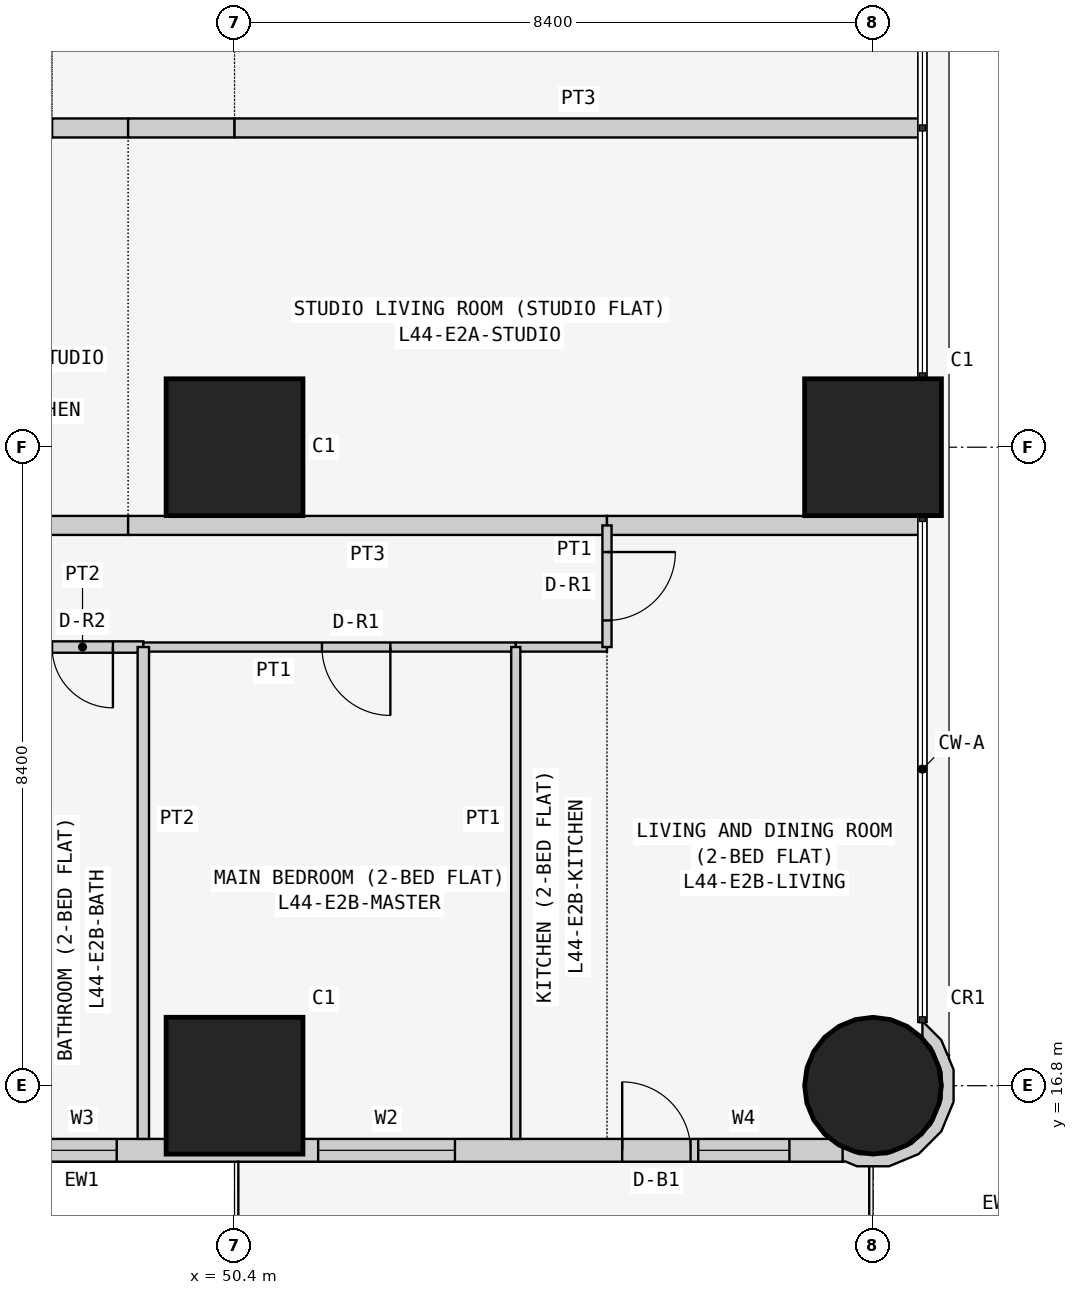
"""IFC4 building model, lengths in metres.
Left out: names, types, materials, properties, quantities, classifications, styles, units other than length and angle.
Written with IfcOpenShell. Run it as: python <this file> out.ifc"""

import sys

from ifc_helpers import new_model, si_unit, direction, frame, frame_2d, origin, origin_2d, place, context, subcontext, project, spatial, polyline, rectangle, circle, outline, extrude, element, fill, save


model = new_model("IFC4")
c1 = context("Model", 3, precision=1e-05, world=origin(), true_north=direction((0.0, 1.0)))
c2 = subcontext(c1, "Body", "Model", "MODEL_VIEW")
j1 = project(units=[si_unit("LENGTHUNIT", "METRE"), si_unit("PLANEANGLEUNIT", "RADIAN")], contexts=[c1])
p1 = place(None, origin())
s1 = spatial("IfcSite", under=j1, at=p1, CompositionType="ELEMENT")
p2 = place(p1, origin())
s2 = spatial("IfcBuilding", under=s1, at=p2, CompositionType="ELEMENT")
p3 = place(p2, frame((0.0, 0.0, 170.1)))
s3 = spatial("IfcBuildingStorey", under=s2, at=p3, CompositionType="ELEMENT", Elevation=170.1)
for number, where, z_axis, x_axis in (
    (1, (50.4, 16.8, 0.0), (0.0, 0.0, 1.0), (1.0, 0.0, 0.0)),
    (2, (50.4, 25.2, 0.0), (0.0, 0.0, 1.0), (1.0, 0.0, 0.0)),
):
    element("IfcColumn", number, at=place(p3, frame(where, z_axis=z_axis, x_axis=x_axis)), inside=s3, PredefinedType="COLUMN", context=c2, shape_type="SweptSolid", body=[
        extrude(rectangle(XDim=1.8, YDim=1.8, at=origin_2d()), origin(), (0.0, 0.0, 1.0), 3.6),
    ])
p4 = place(p3, frame((58.8, 16.8, 0.0), z_axis=(0.0, 0.0, 1.0), x_axis=(1.0, 0.0, 0.0)))
e3 = element("IfcColumn", 3, at=p4, inside=s3, PredefinedType="COLUMN", context=c2, shape_type="SweptSolid", body=[
    extrude(circle(Radius=0.9, at=origin_2d()), origin(), (0.0, 0.0, 1.0), 3.6),
])
p5 = place(p3, frame((58.8, 25.2, 0.0), z_axis=(0.0, 0.0, 1.0), x_axis=(1.0, 0.0, 0.0)))
e4 = element("IfcColumn", 4, at=p5, inside=s3, PredefinedType="COLUMN", context=c2, shape_type="SweptSolid", body=[
    extrude(rectangle(XDim=1.8, YDim=1.8, at=origin_2d()), origin(), (0.0, 0.0, 1.0), 3.6),
])
p6 = place(p3, frame((43.0, 15.95, 0.0), z_axis=(0.0, 0.0, 1.0), x_axis=(1.0, 0.0, 0.0)))
e5 = element("IfcWall", 5, at=p6, inside=s3, PredefinedType="SOLIDWALL", context=c2, shape_type="SweptSolid", body=[
    extrude(rectangle(XDim=15.4, YDim=0.3, at=frame_2d((7.7, 0.0))), origin(), (0.0, 0.0, 1.0), 3.45),
])
p7 = place(p6, frame((1.2, 0.0, 0.9)))
e6 = element("IfcOpeningElement", 6, at=p7, cuts=e5, PredefinedType="OPENING", context=c2, shape_type="SweptSolid", body=[
    extrude(rectangle(XDim=1.8, YDim=1.5, at=frame_2d((0.9, 0.75))), frame((0.0, 0.16, 0.0), z_axis=(0.0, -1.0, 0.0), x_axis=(1.0, 0.0, 0.0)), (0.0, 0.0, 1.0), 0.32),
])
p8 = place(p6, frame((4.95, 0.0, 1.5)))
e7 = element("IfcOpeningElement", 7, at=p8, cuts=e5, PredefinedType="OPENING", context=c2, shape_type="SweptSolid", body=[
    extrude(rectangle(XDim=0.9, YDim=0.7, at=frame_2d((0.45, 0.35))), frame((0.0, 0.16, 0.0), z_axis=(0.0, -1.0, 0.0), x_axis=(1.0, 0.0, 0.0)), (0.0, 0.0, 1.0), 0.32),
])
p9 = place(p6, frame((8.5, 0.0, 0.9)))
e8 = element("IfcOpeningElement", 8, at=p9, cuts=e5, PredefinedType="OPENING", context=c2, shape_type="SweptSolid", body=[
    extrude(rectangle(XDim=1.8, YDim=1.5, at=frame_2d((0.9, 0.75))), frame((0.0, 0.16, 0.0), z_axis=(0.0, -1.0, 0.0), x_axis=(1.0, 0.0, 0.0)), (0.0, 0.0, 1.0), 0.32),
])
p10 = place(p6, frame((12.5, 0.0, 0.0)))
e9 = element("IfcOpeningElement", 9, at=p10, cuts=e5, PredefinedType="OPENING", context=c2, shape_type="SweptSolid", body=[
    extrude(rectangle(XDim=0.9, YDim=2.4, at=frame_2d((0.45, 1.2))), frame((0.0, 0.16, 0.0), z_axis=(0.0, -1.0, 0.0), x_axis=(1.0, 0.0, 0.0)), (0.0, 0.0, 1.0), 0.32),
])
p11 = place(p6, frame((13.5, 0.0, 0.9)))
e10 = element("IfcOpeningElement", 10, at=p11, cuts=e5, PredefinedType="OPENING", context=c2, shape_type="SweptSolid", body=[
    extrude(rectangle(XDim=1.2, YDim=1.5, at=frame_2d((0.6, 0.75))), frame((0.0, 0.16, 0.0), z_axis=(0.0, -1.0, 0.0), x_axis=(1.0, 0.0, 0.0)), (0.0, 0.0, 1.0), 0.32),
])
p12 = place(p3, frame((58.436, 15.89, 0.0), z_axis=(0.0, 0.0, 1.0), x_axis=(0.926129809145, -0.377204953059, 0.0)))
e11 = element("IfcWall", 11, at=p12, inside=s3, PredefinedType="SOLIDWALL", context=c2, shape_type="SweptSolid", body=[
    extrude(outline(polyline([(0.769, 1.728), (0.75, 1.723), (0.6, 1.875), (0.295, 2.004), (0.281, 1.998), (0.36, 1.803), (0.509, 1.741), (0.761, 1.486), (0.896, 1.154), (0.894, 0.795), (0.755, 0.465), (0.5, 0.213), (0.168, 0.078), (-0.1, 0.08), (0.0, -0.097), (0.03, -0.08), (0.198, -0.081), (0.589, 0.078), (0.889, 0.374), (1.052, 0.763), (1.055, 1.185), (0.896, 1.575), (0.778, 1.695), (0.769, 1.728)])), origin(), (0.0, 0.0, 1.0), 3.45),
])
p13 = place(p3, frame((48.0, 29.4, 0.0), z_axis=(0.0, 0.0, 1.0), x_axis=(1.0, 0.0, 0.0)))
e12 = element("IfcWall", 12, at=p13, inside=s3, PredefinedType="PARTITIONING", context=c2, shape_type="SweptSolid", body=[
    extrude(rectangle(XDim=1.0, YDim=0.25, at=frame_2d((0.5, 0.0))), origin(), (0.0, 0.0, 1.0), 3.45),
])
p14 = place(p3, frame((49.0, 29.4, 0.0), z_axis=(0.0, 0.0, 1.0), x_axis=(1.0, 0.0, 0.0)))
e13 = element("IfcWall", 13, at=p14, inside=s3, PredefinedType="PARTITIONING", context=c2, shape_type="SweptSolid", body=[
    extrude(rectangle(XDim=1.4, YDim=0.25, at=frame_2d((0.7, 0.0))), origin(), (0.0, 0.0, 1.0), 3.45),
])
p15 = place(p3, frame((50.4, 29.4, 0.0), z_axis=(0.0, 0.0, 1.0), x_axis=(1.0, 0.0, 0.0)))
e14 = element("IfcWall", 14, at=p15, inside=s3, PredefinedType="PARTITIONING", context=c2, shape_type="SweptSolid", body=[
    extrude(rectangle(XDim=9.05, YDim=0.25, at=frame_2d((4.525, 0.0))), origin(), (0.0, 0.0, 1.0), 3.45),
])
p16 = place(p3, frame((49.0, 24.171, 0.0), z_axis=(0.0, 0.0, 1.0), x_axis=(-1.0, 0.0, 0.0)))
e15 = element("IfcWall", 15, at=p16, inside=s3, PredefinedType="PARTITIONING", context=c2, shape_type="SweptSolid", body=[
    extrude(rectangle(XDim=3.6, YDim=0.25, at=frame_2d((1.8, 0.0))), origin(), (0.0, 0.0, 1.0), 3.45),
])
p17 = place(p3, frame((55.3, 24.171, 0.0), z_axis=(0.0, 0.0, 1.0), x_axis=(-1.0, 0.0, 0.0)))
e16 = element("IfcWall", 16, at=p17, inside=s3, PredefinedType="PARTITIONING", context=c2, shape_type="SweptSolid", body=[
    extrude(rectangle(XDim=6.3, YDim=0.25, at=frame_2d((3.15, 0.0))), origin(), (0.0, 0.0, 1.0), 3.45),
])
p18 = place(p3, frame((59.45, 24.171, 0.0), z_axis=(0.0, 0.0, 1.0), x_axis=(-1.0, 0.0, 0.0)))
e17 = element("IfcWall", 17, at=p18, inside=s3, PredefinedType="PARTITIONING", context=c2, shape_type="SweptSolid", body=[
    extrude(rectangle(XDim=4.15, YDim=0.25, at=frame_2d((2.075, 0.0))), origin(), (0.0, 0.0, 1.0), 3.45),
])
p19 = place(p3, frame((49.2, 22.571, 0.0), z_axis=(0.0, 0.0, 1.0), x_axis=(-1.0, 0.0, 0.0)))
e18 = element("IfcWall", 18, at=p19, inside=s3, PredefinedType="PARTITIONING", context=c2, shape_type="SweptSolid", body=[
    extrude(rectangle(XDim=1.6, YDim=0.15, at=frame_2d((0.8, 0.0))), origin(), (0.0, 0.0, 1.0), 3.45),
])
p20 = place(p19, frame((0.4, 0.0, 0.0)))
e19 = element("IfcOpeningElement", 19, at=p20, cuts=e18, PredefinedType="OPENING", context=c2, shape_type="SweptSolid", body=[
    extrude(rectangle(XDim=0.8, YDim=2.1, at=frame_2d((0.4, 1.05))), frame((0.0, 0.085, 0.0), z_axis=(0.0, -1.0, 0.0), x_axis=(1.0, 0.0, 0.0)), (0.0, 0.0, 1.0), 0.17),
])
p21 = place(p3, frame((54.1, 22.571, 0.0), z_axis=(0.0, 0.0, 1.0), x_axis=(-1.0, 0.0, 0.0)))
e20 = element("IfcWall", 20, at=p21, inside=s3, PredefinedType="PARTITIONING", context=c2, shape_type="SweptSolid", body=[
    extrude(rectangle(XDim=4.9, YDim=0.12, at=frame_2d((2.45, 0.0))), origin(), (0.0, 0.0, 1.0), 3.45),
])
p22 = place(p21, frame((1.65, 0.0, 0.0)))
e21 = element("IfcOpeningElement", 21, at=p22, cuts=e20, PredefinedType="OPENING", context=c2, shape_type="SweptSolid", body=[
    extrude(rectangle(XDim=0.9, YDim=2.1, at=frame_2d((0.45, 1.05))), frame((0.0, 0.07, 0.0), z_axis=(0.0, -1.0, 0.0), x_axis=(1.0, 0.0, 0.0)), (0.0, 0.0, 1.0), 0.14),
])
p23 = place(p3, frame((55.3, 22.571, 0.0), z_axis=(0.0, 0.0, 1.0), x_axis=(-1.0, 0.0, 0.0)))
e22 = element("IfcWall", 22, at=p23, inside=s3, PredefinedType="PARTITIONING", context=c2, shape_type="SweptSolid", body=[
    extrude(rectangle(XDim=1.2, YDim=0.12, at=frame_2d((0.6, 0.0))), origin(), (0.0, 0.0, 1.0), 3.45),
])
p24 = place(p3, frame((55.3, 24.171, 0.0), z_axis=(0.0, 0.0, 1.0), x_axis=(0.0, -1.0, 0.0)))
e23 = element("IfcWall", 23, at=p24, inside=s3, PredefinedType="PARTITIONING", context=c2, shape_type="SweptSolid", body=[
    extrude(rectangle(XDim=1.6, YDim=0.12, at=frame_2d((0.8, 0.0))), origin(), (0.0, 0.0, 1.0), 3.45),
])
p25 = place(p24, frame((0.35, 0.0, 0.0)))
e24 = element("IfcOpeningElement", 24, at=p25, cuts=e23, PredefinedType="OPENING", context=c2, shape_type="SweptSolid", body=[
    extrude(rectangle(XDim=0.9, YDim=2.1, at=frame_2d((0.45, 1.05))), frame((0.0, 0.07, 0.0), z_axis=(0.0, -1.0, 0.0), x_axis=(1.0, 0.0, 0.0)), (0.0, 0.0, 1.0), 0.14),
])
p26 = place(p3, frame((49.2, 22.571, 0.0), z_axis=(0.0, 0.0, 1.0), x_axis=(0.0, -1.0, 0.0)))
e25 = element("IfcWall", 25, at=p26, inside=s3, PredefinedType="PARTITIONING", context=c2, shape_type="SweptSolid", body=[
    extrude(rectangle(XDim=6.471, YDim=0.15, at=frame_2d((3.235, 0.0))), origin(), (0.0, 0.0, 1.0), 3.45),
])
p27 = place(p3, frame((54.1, 22.571, 0.0), z_axis=(0.0, 0.0, 1.0), x_axis=(0.0, -1.0, 0.0)))
e26 = element("IfcWall", 26, at=p27, inside=s3, PredefinedType="PARTITIONING", context=c2, shape_type="SweptSolid", body=[
    extrude(rectangle(XDim=6.471, YDim=0.12, at=frame_2d((3.235, 0.0))), origin(), (0.0, 0.0, 1.0), 3.45),
])
p28 = place(p8, origin())
e27 = element("IfcWindow", 27, at=p28, inside=s3, PartitioningType="SINGLE_PANEL", PredefinedType="WINDOW", context=c2, shape_type="SweptSolid", body=[
    extrude(rectangle(XDim=0.9, YDim=0.7, at=frame_2d((0.45, 0.35))), frame((0.0, 0.03, 0.0), z_axis=(0.0, -1.0, 0.0), x_axis=(1.0, 0.0, 0.0)), (0.0, 0.0, 1.0), 0.06),
])
fill(e7, e27)
p29 = place(p9, origin())
e28 = element("IfcWindow", 28, at=p29, inside=s3, PartitioningType="SINGLE_PANEL", PredefinedType="WINDOW", context=c2, shape_type="SweptSolid", body=[
    extrude(rectangle(XDim=1.8, YDim=1.5, at=frame_2d((0.9, 0.75))), frame((0.0, 0.03, 0.0), z_axis=(0.0, -1.0, 0.0), x_axis=(1.0, 0.0, 0.0)), (0.0, 0.0, 1.0), 0.06),
])
fill(e8, e28)
p30 = place(p10, origin())
e29 = element("IfcDoor", 29, at=p30, inside=s3, OperationType="SINGLE_SWING_LEFT", PredefinedType="DOOR", context=c2, shape_type="SweptSolid", body=[
    extrude(rectangle(XDim=0.9, YDim=2.4, at=frame_2d((0.45, 1.2))), frame((0.0, 0.025, 0.0), z_axis=(0.0, -1.0, 0.0), x_axis=(1.0, 0.0, 0.0)), (0.0, 0.0, 1.0), 0.05),
])
fill(e9, e29)
p31 = place(p11, origin())
e30 = element("IfcWindow", 30, at=p31, inside=s3, PartitioningType="SINGLE_PANEL", PredefinedType="WINDOW", context=c2, shape_type="SweptSolid", body=[
    extrude(rectangle(XDim=1.2, YDim=1.5, at=frame_2d((0.6, 0.75))), frame((0.0, 0.03, 0.0), z_axis=(0.0, -1.0, 0.0), x_axis=(1.0, 0.0, 0.0)), (0.0, 0.0, 1.0), 0.06),
])
fill(e10, e30)
p32 = place(p20, origin())
e31 = element("IfcDoor", 31, at=p32, inside=s3, OperationType="SINGLE_SWING_LEFT", PredefinedType="DOOR", context=c2, shape_type="SweptSolid", body=[
    extrude(rectangle(XDim=0.8, YDim=2.1, at=frame_2d((0.4, 1.05))), frame((0.0, 0.025, 0.0), z_axis=(0.0, -1.0, 0.0), x_axis=(1.0, 0.0, 0.0)), (0.0, 0.0, 1.0), 0.05),
])
fill(e19, e31)
p33 = place(p22, origin())
e32 = element("IfcDoor", 32, at=p33, inside=s3, OperationType="SINGLE_SWING_LEFT", PredefinedType="DOOR", context=c2, shape_type="SweptSolid", body=[
    extrude(rectangle(XDim=0.9, YDim=2.1, at=frame_2d((0.45, 1.05))), frame((0.0, 0.025, 0.0), z_axis=(0.0, -1.0, 0.0), x_axis=(1.0, 0.0, 0.0)), (0.0, 0.0, 1.0), 0.05),
])
fill(e21, e32)
p34 = place(p25, origin())
e33 = element("IfcDoor", 33, at=p34, inside=s3, OperationType="SINGLE_SWING_LEFT", PredefinedType="DOOR", context=c2, shape_type="SweptSolid", body=[
    extrude(rectangle(XDim=0.9, YDim=2.1, at=frame_2d((0.45, 1.05))), frame((0.0, 0.025, 0.0), z_axis=(0.0, -1.0, 0.0), x_axis=(1.0, 0.0, 0.0)), (0.0, 0.0, 1.0), 0.05),
])
fill(e24, e33)
save(model, sys.argv[1])
